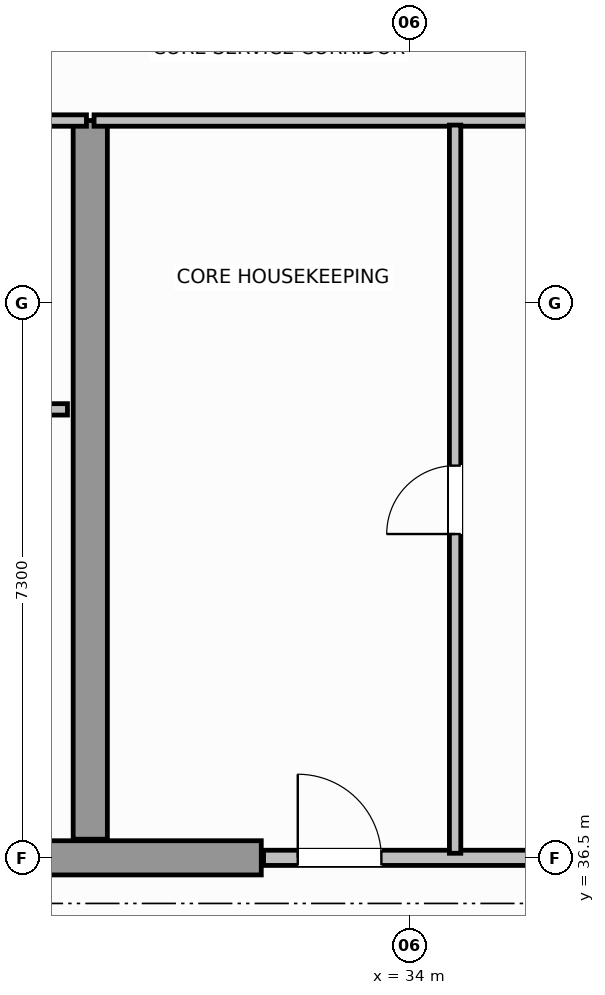
"""IFC4 building model, lengths in metres.
Left out: names, types, materials, properties, quantities, classifications, styles, units other than length and angle.
Written with IfcOpenShell. Run it as: python <this file> out.ifc"""

import sys

from ifc_helpers import new_model, si_unit, direction, frame, frame_2d, origin, place, context, subcontext, project, spatial, rectangle, extrude, source, transform, mapped, element, fill, save


model = new_model("IFC4")
c1 = context("Model", 3, precision=1e-05, world=origin(), true_north=direction((0.0, 1.0)))
c2 = subcontext(c1, "Body", "Model", "MODEL_VIEW")
j1 = project(units=[si_unit("LENGTHUNIT", "METRE"), si_unit("PLANEANGLEUNIT", "RADIAN")], contexts=[c1])
p1 = place(None, origin())
s1 = spatial("IfcSite", under=j1, at=p1, CompositionType="ELEMENT")
p2 = place(p1, origin())
s2 = spatial("IfcBuilding", under=s1, at=p2, CompositionType="ELEMENT")
p3 = place(p2, frame((0.0, 0.0, 280.2)))
s3 = spatial("IfcBuildingStorey", under=s2, at=p3, CompositionType="ELEMENT", Elevation=280.2)
p4 = place(p3, frame((27.55, 36.5, 0.0), z_axis=(0.0, 0.0, 1.0), x_axis=(1.0, 0.0, 0.0)))
e1 = element("IfcWall", 1, at=p4, inside=s3, PredefinedType="SHEAR", context=c2, shape_type="SweptSolid", body=[
    extrude(rectangle(XDim=4.5, YDim=0.45, at=frame_2d((2.25, 0.0))), origin(), (0.0, 0.0, 1.0), 3.8),
])
p5 = place(p3, frame((29.8, 36.745, 0.0), z_axis=(0.0, 0.0, 1.0), x_axis=(0.0, 1.0, 0.0)))
e2 = element("IfcWall", 2, at=p5, inside=s3, PredefinedType="SHEAR", context=c2, shape_type="SweptSolid", body=[
    extrude(rectangle(XDim=9.455, YDim=0.45, at=frame_2d((4.728, 0.0))), origin(), (0.0, 0.0, 1.0), 3.8),
])
p6 = place(p3, frame((21.25, 46.2, 0.0), z_axis=(0.0, 0.0, 1.0), x_axis=(1.0, 0.0, 0.0)))
e3 = element("IfcWall", 3, at=p6, inside=s3, PredefinedType="PARTITIONING", context=c2, shape_type="SweptSolid", body=[
    extrude(rectangle(XDim=8.5, YDim=0.15, at=frame_2d((4.25, 0.0))), origin(), (0.0, 0.0, 1.0), 3.58),
])
p7 = place(p3, frame((21.5, 42.4, 0.0), z_axis=(0.0, 0.0, 1.0), x_axis=(1.0, 0.0, 0.0)))
e4 = element("IfcWall", 4, at=p7, inside=s3, PredefinedType="PARTITIONING", context=c2, shape_type="SweptSolid", body=[
    extrude(rectangle(XDim=8.0, YDim=0.15, at=frame_2d((4.0, 0.0))), origin(), (0.0, 0.0, 1.0), 3.58),
])
p8 = place(p7, frame((3.4, 0.0, 0.0)))
e5 = element("IfcOpeningElement", 5, at=p8, cuts=e4, PredefinedType="OPENING", context=c2, shape_type="SweptSolid", body=[
    extrude(rectangle(XDim=0.9, YDim=2.1, at=frame_2d((0.45, 1.05))), frame((0.0, 0.085, 0.0), z_axis=(0.0, -1.0, 0.0), x_axis=(1.0, 0.0, 0.0)), (0.0, 0.0, 1.0), 0.17),
])
p9 = place(p3, frame((32.08, 36.5, 0.0), z_axis=(0.0, 0.0, 1.0), x_axis=(1.0, 0.0, 0.0)))
e6 = element("IfcWall", 6, at=p9, inside=s3, PredefinedType="SOLIDWALL", context=c2, shape_type="SweptSolid", body=[
    extrude(rectangle(XDim=4.04, YDim=0.2, at=frame_2d((2.02, 0.0))), origin(), (0.0, 0.0, 1.0), 3.12),
])
p10 = place(p9, frame((0.45, 0.0, 0.0)))
e7 = element("IfcOpeningElement", 7, at=p10, cuts=e6, PredefinedType="OPENING", context=c2, shape_type="SweptSolid", body=[
    extrude(rectangle(XDim=1.1, YDim=2.15, at=frame_2d((0.55, 1.075))), frame((0.0, 0.11, 0.0), z_axis=(0.0, -1.0, 0.0), x_axis=(1.0, 0.0, 0.0)), (0.0, 0.0, 1.0), 0.22),
])
p11 = place(p3, frame((29.85, 46.2, 0.0), z_axis=(0.0, 0.0, 1.0), x_axis=(1.0, 0.0, 0.0)))
e8 = element("IfcWall", 8, at=p11, inside=s3, PredefinedType="PARTITIONING", context=c2, shape_type="SweptSolid", body=[
    extrude(rectangle(XDim=8.5, YDim=0.15, at=frame_2d((4.25, 0.0))), origin(), (0.0, 0.0, 1.0), 3.58),
])
p12 = place(p3, frame((34.6, 36.56, 0.0), z_axis=(0.0, 0.0, 1.0), x_axis=(0.0, 1.0, 0.0)))
e9 = element("IfcWall", 9, at=p12, inside=s3, PredefinedType="PARTITIONING", context=c2, shape_type="SweptSolid", body=[
    extrude(rectangle(XDim=9.58, YDim=0.15, at=frame_2d((4.79, 0.0))), origin(), (0.0, 0.0, 1.0), 3.58),
])
p13 = place(p12, frame((4.2, 0.0, 0.0)))
e10 = element("IfcOpeningElement", 10, at=p13, cuts=e9, PredefinedType="OPENING", context=c2, shape_type="SweptSolid", body=[
    extrude(rectangle(XDim=0.9, YDim=2.1, at=frame_2d((0.45, 1.05))), frame((0.0, 0.085, 0.0), z_axis=(0.0, -1.0, 0.0), x_axis=(1.0, 0.0, 0.0)), (0.0, 0.0, 1.0), 0.17),
])
m1 = source(origin(), c2, "Body", "SweptSolid", [
    extrude(rectangle(XDim=1.1, YDim=2.15, at=frame_2d((0.55, 1.075))), frame((0.0, 0.025, 0.0), z_axis=(0.0, -1.0, 0.0), x_axis=(1.0, 0.0, 0.0)), (0.0, 0.0, 1.0), 0.05),
])
p14 = place(p10, origin())
e11 = element("IfcDoor", 11, at=p14, inside=s3, OperationType="SINGLE_SWING_LEFT", PredefinedType="DOOR", context=c2, shape_type="MappedRepresentation", body=[
    mapped(m1, transform((0.0, 0.0, 0.0), scale=1.0)),
])
fill(e7, e11)
m2 = source(origin(), c2, "Body", "SweptSolid", [
    extrude(rectangle(XDim=0.9, YDim=2.1, at=frame_2d((0.45, 1.05))), frame((0.0, 0.025, 0.0), z_axis=(0.0, -1.0, 0.0), x_axis=(1.0, 0.0, 0.0)), (0.0, 0.0, 1.0), 0.05),
])
p15 = place(p13, origin())
e12 = element("IfcDoor", 12, at=p15, inside=s3, OperationType="SINGLE_SWING_RIGHT", PredefinedType="DOOR", context=c2, shape_type="MappedRepresentation", body=[
    mapped(m2, transform((0.0, 0.0, 0.0), scale=1.0)),
])
fill(e10, e12)
save(model, sys.argv[1])
